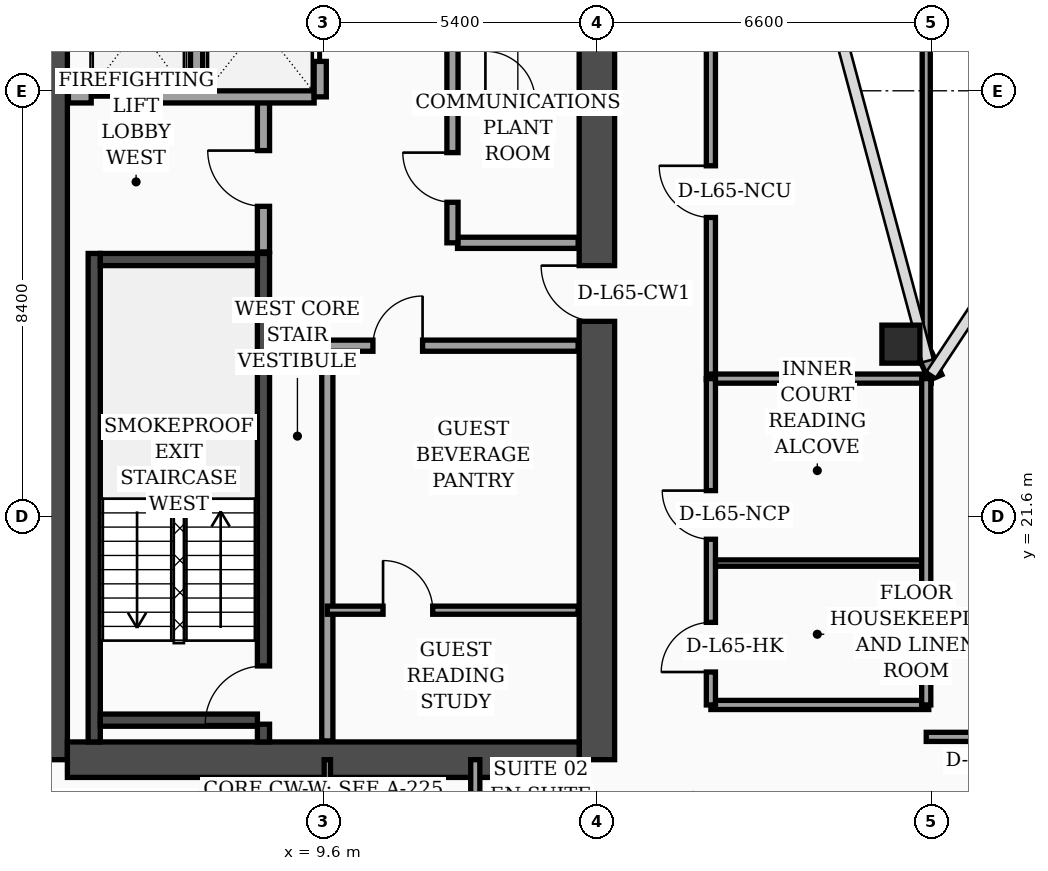
"""IFC4 building model, lengths in metres.
Left out: names, types, materials, properties, quantities, classifications, styles, units other than length and angle.
Written with IfcOpenShell. Run it as: python <this file> out.ifc"""

import sys

from ifc_helpers import new_model, si_unit, direction, frame, frame_2d, origin, origin_2d, place, context, subcontext, project, spatial, rectangle, hollow_rectangle, extrude, element, fill, save


model = new_model("IFC4")
c1 = context("Model", 3, precision=1e-05, world=origin(), true_north=direction((0.0, 1.0)))
c2 = subcontext(c1, "Body", "Model", "MODEL_VIEW")
j1 = project(units=[si_unit("LENGTHUNIT", "METRE"), si_unit("PLANEANGLEUNIT", "RADIAN")], contexts=[c1])
p1 = place(None, origin())
s1 = spatial("IfcSite", under=j1, at=p1, CompositionType="ELEMENT")
p2 = place(p1, origin())
s2 = spatial("IfcBuilding", under=s1, at=p2, CompositionType="ELEMENT")
p3 = place(p2, frame((0.0, 0.0, 263.5)))
s3 = spatial("IfcBuildingStorey", under=s2, at=p3, CompositionType="ELEMENT", Elevation=263.5)
p4 = place(p3, frame((4.2, 16.8, 0.0), z_axis=(0.0, 0.0, 1.0), x_axis=(0.0, 1.0, 0.0)))
e1 = element("IfcWall", 1, at=p4, inside=s3, PredefinedType="SHEAR", context=c2, shape_type="SweptSolid", body=[
    extrude(rectangle(XDim=21.6, YDim=0.7, at=frame_2d((10.8, 0.0))), origin(), (0.0, 0.0, 1.0), 3.56),
])
p5 = place(p3, frame((15.0, 16.8, 0.0), z_axis=(0.0, 0.0, 1.0), x_axis=(0.0, 1.0, 0.0)))
e2 = element("IfcWall", 2, at=p5, inside=s3, PredefinedType="SHEAR", context=c2, shape_type="SweptSolid", body=[
    extrude(rectangle(XDim=21.6, YDim=0.7, at=frame_2d((10.8, 0.0))), origin(), (0.0, 0.0, 1.0), 3.56),
])
p6 = place(p5, frame((8.65, 0.0, 0.0)))
e3 = element("IfcOpeningElement", 3, at=p6, cuts=e2, PredefinedType="OPENING", context=c2, shape_type="SweptSolid", body=[
    extrude(rectangle(XDim=1.1, YDim=2.2, at=frame_2d((0.55, 1.1))), frame((0.0, 0.36, 0.0), z_axis=(0.0, -1.0, 0.0), x_axis=(1.0, 0.0, 0.0)), (0.0, 0.0, 1.0), 0.72),
])
p7 = place(p5, frame((18.9, 0.0, 0.0)))
e4 = element("IfcOpeningElement", 4, at=p7, cuts=e2, PredefinedType="OPENING", context=c2, shape_type="SweptSolid", body=[
    extrude(rectangle(XDim=1.1, YDim=2.2, at=frame_2d((0.55, 1.1))), frame((0.0, 0.36, 0.0), z_axis=(0.0, -1.0, 0.0), x_axis=(1.0, 0.0, 0.0)), (0.0, 0.0, 1.0), 0.72),
])
p8 = place(p3, frame((4.55, 16.8, 0.0), z_axis=(0.0, 0.0, 1.0), x_axis=(1.0, 0.0, 0.0)))
e5 = element("IfcWall", 5, at=p8, inside=s3, PredefinedType="SHEAR", context=c2, shape_type="SweptSolid", body=[
    extrude(rectangle(XDim=10.1, YDim=0.7, at=frame_2d((5.05, 0.0))), origin(), (0.0, 0.0, 1.0), 3.56),
])
p9 = place(p3, frame((5.08, 17.15, 0.0), z_axis=(0.0, 0.0, 1.0), x_axis=(0.0, 1.0, 0.0)))
e6 = element("IfcWall", 6, at=p9, inside=s3, PredefinedType="SOLIDWALL", context=c2, shape_type="SweptSolid", body=[
    extrude(rectangle(XDim=9.64, YDim=0.24, at=frame_2d((4.82, 0.0))), origin(), (0.0, 0.0, 1.0), 3.56),
])
p10 = place(p3, frame((8.42, 17.15, 0.0), z_axis=(0.0, 0.0, 1.0), x_axis=(0.0, 1.0, 0.0)))
e7 = element("IfcWall", 7, at=p10, inside=s3, PredefinedType="SOLIDWALL", context=c2, shape_type="SweptSolid", body=[
    extrude(rectangle(XDim=9.64, YDim=0.24, at=frame_2d((4.82, 0.0))), origin(), (0.0, 0.0, 1.0), 3.56),
])
p11 = place(p10, frame((0.35, 0.0, 0.0)))
e8 = element("IfcOpeningElement", 8, at=p11, cuts=e7, PredefinedType="OPENING", context=c2, shape_type="SweptSolid", body=[
    extrude(rectangle(XDim=1.15, YDim=2.2, at=frame_2d((0.575, 1.1))), frame((0.0, 0.13, 0.0), z_axis=(0.0, -1.0, 0.0), x_axis=(1.0, 0.0, 0.0)), (0.0, 0.0, 1.0), 0.26),
])
for number, where, z_axis, x_axis in (
    (9, (5.2, 17.58, 0.0), (0.0, 0.0, 1.0), (1.0, 0.0, 0.0)),
    (10, (5.2, 26.67, 0.0), (0.0, 0.0, 1.0), (1.0, 0.0, 0.0)),
):
    element("IfcWall", number, at=place(p3, frame(where, z_axis=z_axis, x_axis=x_axis)), inside=s3, PredefinedType="SOLIDWALL", context=c2, shape_type="SweptSolid", body=[
        extrude(rectangle(XDim=3.1, YDim=0.24, at=frame_2d((1.55, 0.0))), origin(), (0.0, 0.0, 1.0), 3.56),
    ])
p12 = place(p3, frame((21.0, 25.0, 0.0), z_axis=(0.0, 0.0, 1.0), x_axis=(1.0, 0.0, 0.0)))
e11 = element("IfcColumn", 11, at=p12, inside=s3, PredefinedType="COLUMN", context=c2, shape_type="SweptSolid", body=[
    extrude(hollow_rectangle(XDim=0.75, YDim=0.75, WallThickness=0.032, at=origin_2d()), origin(), (0.0, 0.0, 1.0), 3.56),
])
p13 = place(p3, frame((21.68, 24.34, 0.0), z_axis=(0.0, 0.0, 1.0), x_axis=(-0.40758134973, 0.913168901875, 0.0)))
e12 = element("IfcWall", 12, at=p13, inside=s3, PredefinedType="SOLIDWALL", context=c2, shape_type="SweptSolid", body=[
    extrude(rectangle(XDim=0.471, YDim=0.28, at=frame_2d((0.235, 0.0))), origin(), (0.0, 0.0, 1.0), 3.56),
])
p14 = place(p3, frame((8.42, 26.82, 0.0), z_axis=(0.0, 0.0, 1.0), x_axis=(0.0, 1.0, 0.0)))
e13 = element("IfcWall", 13, at=p14, inside=s3, PredefinedType="SOLIDWALL", context=c2, shape_type="SweptSolid", body=[
    extrude(rectangle(XDim=3.0, YDim=0.24, at=frame_2d((1.5, 0.0))), origin(), (0.0, 0.0, 1.0), 3.56),
])
p15 = place(p14, frame((0.9, 0.0, 0.0)))
e14 = element("IfcOpeningElement", 14, at=p15, cuts=e13, PredefinedType="OPENING", context=c2, shape_type="SweptSolid", body=[
    extrude(rectangle(XDim=1.1, YDim=2.2, at=frame_2d((0.55, 1.1))), frame((0.0, 0.13, 0.0), z_axis=(0.0, -1.0, 0.0), x_axis=(1.0, 0.0, 0.0)), (0.0, 0.0, 1.0), 0.26),
])
p16 = place(p3, frame((4.57, 29.88, 0.0), z_axis=(0.0, 0.0, 1.0), x_axis=(1.0, 0.0, 0.0)))
e15 = element("IfcWall", 15, at=p16, inside=s3, PredefinedType="SOLIDWALL", context=c2, shape_type="SweptSolid", body=[
    extrude(rectangle(XDim=4.85, YDim=0.24, at=frame_2d((2.425, 0.0))), origin(), (0.0, 0.0, 1.0), 3.56),
])
p17 = place(p16, frame((0.45, 0.0, 0.0)))
e16 = element("IfcOpeningElement", 16, at=p17, cuts=e15, PredefinedType="OPENING", context=c2, shape_type="SweptSolid", body=[
    extrude(rectangle(XDim=1.3, YDim=2.35, at=frame_2d((0.65, 1.175))), frame((0.0, 0.13, 0.0), z_axis=(0.0, -1.0, 0.0), x_axis=(1.0, 0.0, 0.0)), (0.0, 0.0, 1.0), 0.26),
])
p18 = place(p3, frame((7.1, 30.02, 0.0), z_axis=(0.0, 0.0, 1.0), x_axis=(0.0, 1.0, 0.0)))
e17 = element("IfcWall", 17, at=p18, inside=s3, PredefinedType="SOLIDWALL", context=c2, shape_type="SweptSolid", body=[
    extrude(rectangle(XDim=2.63, YDim=0.24, at=frame_2d((1.315, 0.0))), origin(), (0.0, 0.0, 1.0), 3.56),
])
p19 = place(p3, frame((9.54, 29.88, 0.0), z_axis=(0.0, 0.0, 1.0), x_axis=(0.0, 1.0, 0.0)))
e18 = element("IfcWall", 18, at=p19, inside=s3, PredefinedType="SOLIDWALL", context=c2, shape_type="SweptSolid", body=[
    extrude(rectangle(XDim=2.9, YDim=0.24, at=frame_2d((1.45, 0.0))), origin(), (0.0, 0.0, 1.0), 3.56),
])
p20 = place(p19, frame((0.7, 0.0, 0.0)))
e19 = element("IfcOpeningElement", 19, at=p20, cuts=e18, PredefinedType="OPENING", context=c2, shape_type="SweptSolid", body=[
    extrude(rectangle(XDim=1.3, YDim=2.35, at=frame_2d((0.65, 1.175))), frame((0.0, 0.13, 0.0), z_axis=(0.0, -1.0, 0.0), x_axis=(1.0, 0.0, 0.0)), (0.0, 0.0, 1.0), 0.26),
])
p21 = place(p3, frame((9.68, 17.17, 0.0), z_axis=(0.0, 0.0, 1.0), x_axis=(0.0, 1.0, 0.0)))
e20 = element("IfcWall", 20, at=p21, inside=s3, PredefinedType="SOLIDWALL", context=c2, shape_type="SweptSolid", body=[
    extrude(rectangle(XDim=7.83, YDim=0.22, at=frame_2d((3.915, 0.0))), origin(), (0.0, 0.0, 1.0), 3.56),
])
p22 = place(p3, frame((9.68, 19.75, 0.0), z_axis=(0.0, 0.0, 1.0), x_axis=(1.0, 0.0, 0.0)))
e21 = element("IfcWall", 21, at=p22, inside=s3, PredefinedType="PARTITIONING", context=c2, shape_type="SweptSolid", body=[
    extrude(rectangle(XDim=4.95, YDim=0.16, at=frame_2d((2.475, 0.0))), origin(), (0.0, 0.0, 1.0), 3.56),
])
p23 = place(p22, frame((1.1, 0.0, 0.0)))
e22 = element("IfcOpeningElement", 22, at=p23, cuts=e21, PredefinedType="OPENING", context=c2, shape_type="SweptSolid", body=[
    extrude(rectangle(XDim=0.98, YDim=2.15, at=frame_2d((0.49, 1.075))), frame((0.0, 0.09, 0.0), z_axis=(0.0, -1.0, 0.0), x_axis=(1.0, 0.0, 0.0)), (0.0, 0.0, 1.0), 0.18),
])
p24 = place(p3, frame((9.68, 24.97, 0.0), z_axis=(0.0, 0.0, 1.0), x_axis=(1.0, 0.0, 0.0)))
e23 = element("IfcWall", 23, at=p24, inside=s3, PredefinedType="SOLIDWALL", context=c2, shape_type="SweptSolid", body=[
    extrude(rectangle(XDim=4.95, YDim=0.22, at=frame_2d((2.475, 0.0))), origin(), (0.0, 0.0, 1.0), 2.99),
])
p25 = place(p24, frame((0.9, 0.0, 0.0)))
e24 = element("IfcOpeningElement", 24, at=p25, cuts=e23, PredefinedType="OPENING", context=c2, shape_type="SweptSolid", body=[
    extrude(rectangle(XDim=0.98, YDim=2.15, at=frame_2d((0.49, 1.075))), frame((0.0, 0.12, 0.0), z_axis=(0.0, -1.0, 0.0), x_axis=(1.0, 0.0, 0.0)), (0.0, 0.0, 1.0), 0.24),
])
p26 = place(p3, frame((12.25, 27.0, 0.0), z_axis=(0.0, 0.0, 1.0), x_axis=(1.0, 0.0, 0.0)))
e25 = element("IfcWall", 25, at=p26, inside=s3, PredefinedType="SOLIDWALL", context=c2, shape_type="SweptSolid", body=[
    extrude(rectangle(XDim=2.38, YDim=0.22, at=frame_2d((1.19, 0.0))), origin(), (0.0, 0.0, 1.0), 3.56),
])
p27 = place(p3, frame((12.15, 27.0, 0.0), z_axis=(0.0, 0.0, 1.0), x_axis=(0.0, 1.0, 0.0)))
e26 = element("IfcWall", 26, at=p27, inside=s3, PredefinedType="SOLIDWALL", context=c2, shape_type="SweptSolid", body=[
    extrude(rectangle(XDim=7.75, YDim=0.22, at=frame_2d((3.875, 0.0))), origin(), (0.0, 0.0, 1.0), 3.56),
])
p28 = place(p27, frame((0.8, 0.0, 0.0)))
e27 = element("IfcOpeningElement", 27, at=p28, cuts=e26, PredefinedType="OPENING", context=c2, shape_type="SweptSolid", body=[
    extrude(rectangle(XDim=0.98, YDim=2.15, at=frame_2d((0.49, 1.075))), frame((0.0, 0.12, 0.0), z_axis=(0.0, -1.0, 0.0), x_axis=(1.0, 0.0, 0.0)), (0.0, 0.0, 1.0), 0.24),
])
p29 = place(p3, frame((12.25, 29.8, 0.0), z_axis=(0.0, 0.0, 1.0), x_axis=(1.0, 0.0, 0.0)))
e28 = element("IfcWall", 28, at=p29, inside=s3, PredefinedType="PARTITIONING", context=c2, shape_type="SweptSolid", body=[
    extrude(rectangle(XDim=2.38, YDim=0.16, at=frame_2d((1.19, 0.0))), origin(), (0.0, 0.0, 1.0), 3.56),
])
p30 = place(p29, frame((0.55, 0.0, 0.0)))
e29 = element("IfcOpeningElement", 29, at=p30, cuts=e28, PredefinedType="OPENING", context=c2, shape_type="SweptSolid", body=[
    extrude(rectangle(XDim=0.98, YDim=2.15, at=frame_2d((0.49, 1.075))), frame((0.0, 0.09, 0.0), z_axis=(0.0, -1.0, 0.0), x_axis=(1.0, 0.0, 0.0)), (0.0, 0.0, 1.0), 0.18),
])
p31 = place(p3, frame((9.68, 14.67, 0.0), z_axis=(0.0, 0.0, 1.0), x_axis=(0.0, 1.0, 0.0)))
e30 = element("IfcWall", 30, at=p31, inside=s3, PredefinedType="PARTITIONING", context=c2, shape_type="SweptSolid", body=[
    extrude(rectangle(XDim=2.13, YDim=0.125, at=frame_2d((1.065, 0.0))), origin(), (0.0, 0.0, 1.0), 3.56),
])
p32 = place(p3, frame((12.6, 2.44, 0.0), z_axis=(0.0, 0.0, 1.0), x_axis=(0.0, 1.0, 0.0)))
e31 = element("IfcWall", 31, at=p32, inside=s3, PredefinedType="PARTITIONING", context=c2, shape_type="SweptSolid", body=[
    extrude(rectangle(XDim=14.36, YDim=0.18, at=frame_2d((7.18, 0.0))), origin(), (0.0, 0.0, 1.0), 2.99),
])
p33 = place(p32, frame((3.01, 0.0, 0.0)))
e32 = element("IfcOpeningElement", 32, at=p33, cuts=e31, PredefinedType="OPENING", context=c2, shape_type="SweptSolid", body=[
    extrude(rectangle(XDim=1.02, YDim=2.2, at=frame_2d((0.51, 1.1))), frame((0.0, 0.1, 0.0), z_axis=(0.0, -1.0, 0.0), x_axis=(1.0, 0.0, 0.0)), (0.0, 0.0, 1.0), 0.2),
])
p34 = place(p32, frame((8.94, 0.0, 0.0)))
e33 = element("IfcOpeningElement", 33, at=p34, cuts=e31, PredefinedType="OPENING", context=c2, shape_type="SweptSolid", body=[
    extrude(rectangle(XDim=1.02, YDim=2.2, at=frame_2d((0.51, 1.1))), frame((0.0, 0.1, 0.0), z_axis=(0.0, -1.0, 0.0), x_axis=(1.0, 0.0, 0.0)), (0.0, 0.0, 1.0), 0.2),
])
p35 = place(p3, frame((17.25, 24.3, 0.0), z_axis=(0.0, 0.0, 1.0), x_axis=(0.0, 1.0, 0.0)))
e34 = element("IfcWall", 34, at=p35, inside=s3, PredefinedType="PARTITIONING", context=c2, shape_type="SweptSolid", body=[
    extrude(rectangle(XDim=18.15, YDim=0.18, at=frame_2d((9.075, 0.0))), origin(), (0.0, 0.0, 1.0), 2.99),
])
p36 = place(p35, frame((3.2, 0.0, 0.0)))
e35 = element("IfcOpeningElement", 35, at=p36, cuts=e34, PredefinedType="OPENING", context=c2, shape_type="SweptSolid", body=[
    extrude(rectangle(XDim=1.02, YDim=2.2, at=frame_2d((0.51, 1.1))), frame((0.0, 0.1, 0.0), z_axis=(0.0, -1.0, 0.0), x_axis=(1.0, 0.0, 0.0)), (0.0, 0.0, 1.0), 0.2),
])
p37 = place(p3, frame((17.25, 17.88, 0.0), z_axis=(0.0, 0.0, 1.0), x_axis=(1.0, 0.0, 0.0)))
e36 = element("IfcWall", 36, at=p37, inside=s3, PredefinedType="PARTITIONING", context=c2, shape_type="SweptSolid", body=[
    extrude(rectangle(XDim=4.3, YDim=0.18, at=frame_2d((2.15, 0.0))), origin(), (0.0, 0.0, 1.0), 3.56),
])
p38 = place(p3, frame((17.25, 20.68, 0.0), z_axis=(0.0, 0.0, 1.0), x_axis=(1.0, 0.0, 0.0)))
e37 = element("IfcWall", 37, at=p38, inside=s3, PredefinedType="PARTITIONING", context=c2, shape_type="SweptSolid", body=[
    extrude(rectangle(XDim=4.3, YDim=0.125, at=frame_2d((2.15, 0.0))), origin(), (0.0, 0.0, 1.0), 3.56),
])
p39 = place(p3, frame((17.25, 24.32, 0.0), z_axis=(0.0, 0.0, 1.0), x_axis=(1.0, 0.0, 0.0)))
e38 = element("IfcWall", 38, at=p39, inside=s3, PredefinedType="PARTITIONING", context=c2, shape_type="SweptSolid", body=[
    extrude(rectangle(XDim=4.35, YDim=0.18, at=frame_2d((2.175, 0.0))), origin(), (0.0, 0.0, 1.0), 3.56),
])
p40 = place(p3, frame((21.5, 17.88, 0.0), z_axis=(0.0, 0.0, 1.0), x_axis=(0.0, 1.0, 0.0)))
e39 = element("IfcWall", 39, at=p40, inside=s3, PredefinedType="PARTITIONING", context=c2, shape_type="SweptSolid", body=[
    extrude(rectangle(XDim=6.44, YDim=0.18, at=frame_2d((3.22, 0.0))), origin(), (0.0, 0.0, 1.0), 3.56),
])
p41 = place(p3, frame((17.25, 17.88, 0.0), z_axis=(0.0, 0.0, 1.0), x_axis=(0.0, 1.0, 0.0)))
e40 = element("IfcWall", 40, at=p41, inside=s3, PredefinedType="PARTITIONING", context=c2, shape_type="SweptSolid", body=[
    extrude(rectangle(XDim=6.44, YDim=0.18, at=frame_2d((3.22, 0.0))), origin(), (0.0, 0.0, 1.0), 3.56),
])
p42 = place(p41, frame((0.65, 0.0, 0.0)))
e41 = element("IfcOpeningElement", 41, at=p42, cuts=e40, PredefinedType="OPENING", context=c2, shape_type="SweptSolid", body=[
    extrude(rectangle(XDim=0.98, YDim=2.15, at=frame_2d((0.49, 1.075))), frame((0.0, 0.1, 0.0), z_axis=(0.0, -1.0, 0.0), x_axis=(1.0, 0.0, 0.0)), (0.0, 0.0, 1.0), 0.2),
])
p43 = place(p41, frame((3.27, 0.0, 0.0)))
e42 = element("IfcOpeningElement", 42, at=p43, cuts=e40, PredefinedType="OPENING", context=c2, shape_type="SweptSolid", body=[
    extrude(rectangle(XDim=0.96, YDim=2.2, at=frame_2d((0.48, 1.1))), frame((0.0, 0.1, 0.0), z_axis=(0.0, -1.0, 0.0), x_axis=(1.0, 0.0, 0.0)), (0.0, 0.0, 1.0), 0.2),
])
p44 = place(p3, frame((21.5, 24.85, 0.0), z_axis=(0.0, 0.0, 1.0), x_axis=(0.0, 1.0, 0.0)))
e43 = element("IfcWall", 43, at=p44, inside=s3, PredefinedType="PARTITIONING", context=c2, shape_type="SweptSolid", body=[
    extrude(rectangle(XDim=13.05, YDim=0.16, at=frame_2d((6.525, 0.0))), origin(), (0.0, 0.0, 1.0), 2.99),
])
p45 = place(p3, frame((21.5, 17.25, 0.0), z_axis=(0.0, 0.0, 1.0), x_axis=(1.0, 0.0, 0.0)))
e44 = element("IfcWall", 44, at=p45, inside=s3, PredefinedType="PARTITIONING", context=c2, shape_type="SweptSolid", body=[
    extrude(rectangle(XDim=6.9, YDim=0.18, at=frame_2d((3.45, 0.0))), origin(), (0.0, 0.0, 1.0), 3.56),
])
p46 = place(p45, frame((0.95, 0.0, 0.0)))
e45 = element("IfcOpeningElement", 45, at=p46, cuts=e44, PredefinedType="OPENING", context=c2, shape_type="SweptSolid", body=[
    extrude(rectangle(XDim=1.02, YDim=2.2, at=frame_2d((0.51, 1.1))), frame((0.0, 0.1, 0.0), z_axis=(0.0, -1.0, 0.0), x_axis=(1.0, 0.0, 0.0)), (0.0, 0.0, 1.0), 0.2),
])
p47 = place(p15, origin())
e46 = element("IfcDoor", 46, at=p47, inside=s3, OperationType="SINGLE_SWING_RIGHT", PredefinedType="DOOR", context=c2, shape_type="SweptSolid", body=[
    extrude(rectangle(XDim=1.1, YDim=2.2, at=frame_2d((0.55, 1.1))), frame((0.0, 0.025, 0.0), z_axis=(0.0, -1.0, 0.0), x_axis=(1.0, 0.0, 0.0)), (0.0, 0.0, 1.0), 0.05),
])
fill(e14, e46)
p48 = place(p17, origin())
e47 = element("IfcDoor", 47, at=p48, inside=s3, OperationType="DOUBLE_DOOR_SLIDING", PredefinedType="DOOR", context=c2, shape_type="SweptSolid", body=[
    extrude(rectangle(XDim=1.3, YDim=2.35, at=frame_2d((0.65, 1.175))), frame((0.0, 0.025, 0.0), z_axis=(0.0, -1.0, 0.0), x_axis=(1.0, 0.0, 0.0)), (0.0, 0.0, 1.0), 0.05),
])
fill(e16, e47)
p49 = place(p20, origin())
e48 = element("IfcDoor", 48, at=p49, inside=s3, OperationType="DOUBLE_DOOR_SLIDING", PredefinedType="DOOR", context=c2, shape_type="SweptSolid", body=[
    extrude(rectangle(XDim=1.3, YDim=2.35, at=frame_2d((0.65, 1.175))), frame((0.0, 0.025, 0.0), z_axis=(0.0, -1.0, 0.0), x_axis=(1.0, 0.0, 0.0)), (0.0, 0.0, 1.0), 0.05),
])
fill(e19, e48)
p50 = place(p23, origin())
e49 = element("IfcDoor", 49, at=p50, inside=s3, OperationType="SINGLE_SWING_LEFT", PredefinedType="DOOR", context=c2, shape_type="SweptSolid", body=[
    extrude(rectangle(XDim=0.98, YDim=2.15, at=frame_2d((0.49, 1.075))), frame((0.0, 0.025, 0.0), z_axis=(0.0, -1.0, 0.0), x_axis=(1.0, 0.0, 0.0)), (0.0, 0.0, 1.0), 0.05),
])
fill(e22, e49)
p51 = place(p25, origin())
e50 = element("IfcDoor", 50, at=p51, inside=s3, OperationType="SINGLE_SWING_RIGHT", PredefinedType="DOOR", context=c2, shape_type="SweptSolid", body=[
    extrude(rectangle(XDim=0.98, YDim=2.15, at=frame_2d((0.49, 1.075))), frame((0.0, 0.025, 0.0), z_axis=(0.0, -1.0, 0.0), x_axis=(1.0, 0.0, 0.0)), (0.0, 0.0, 1.0), 0.05),
])
fill(e24, e50)
p52 = place(p28, origin())
e51 = element("IfcDoor", 51, at=p52, inside=s3, OperationType="SINGLE_SWING_RIGHT", PredefinedType="DOOR", context=c2, shape_type="SweptSolid", body=[
    extrude(rectangle(XDim=0.98, YDim=2.15, at=frame_2d((0.49, 1.075))), frame((0.0, 0.025, 0.0), z_axis=(0.0, -1.0, 0.0), x_axis=(1.0, 0.0, 0.0)), (0.0, 0.0, 1.0), 0.05),
])
fill(e27, e51)
p53 = place(p30, origin())
e52 = element("IfcDoor", 52, at=p53, inside=s3, OperationType="SINGLE_SWING_LEFT", PredefinedType="DOOR", context=c2, shape_type="SweptSolid", body=[
    extrude(rectangle(XDim=0.98, YDim=2.15, at=frame_2d((0.49, 1.075))), frame((0.0, 0.025, 0.0), z_axis=(0.0, -1.0, 0.0), x_axis=(1.0, 0.0, 0.0)), (0.0, 0.0, 1.0), 0.05),
])
fill(e29, e52)
p54 = place(p36, origin())
e53 = element("IfcDoor", 53, at=p54, inside=s3, OperationType="SINGLE_SWING_RIGHT", PredefinedType="DOOR", context=c2, shape_type="SweptSolid", body=[
    extrude(rectangle(XDim=1.02, YDim=2.2, at=frame_2d((0.51, 1.1))), frame((0.0, 0.025, 0.0), z_axis=(0.0, -1.0, 0.0), x_axis=(1.0, 0.0, 0.0)), (0.0, 0.0, 1.0), 0.05),
])
fill(e35, e53)
p55 = place(p42, origin())
e54 = element("IfcDoor", 54, at=p55, inside=s3, OperationType="SINGLE_SWING_LEFT", PredefinedType="DOOR", context=c2, shape_type="SweptSolid", body=[
    extrude(rectangle(XDim=0.98, YDim=2.15, at=frame_2d((0.49, 1.075))), frame((0.0, 0.025, 0.0), z_axis=(0.0, -1.0, 0.0), x_axis=(1.0, 0.0, 0.0)), (0.0, 0.0, 1.0), 0.05),
])
fill(e41, e54)
p56 = place(p43, origin())
e55 = element("IfcDoor", 55, at=p56, inside=s3, OperationType="SINGLE_SWING_RIGHT", PredefinedType="DOOR", context=c2, shape_type="SweptSolid", body=[
    extrude(rectangle(XDim=0.96, YDim=2.2, at=frame_2d((0.48, 1.1))), frame((0.0, 0.025, 0.0), z_axis=(0.0, -1.0, 0.0), x_axis=(1.0, 0.0, 0.0)), (0.0, 0.0, 1.0), 0.05),
])
fill(e42, e55)
p57 = place(p11, origin())
e56 = element("IfcDoor", 56, at=p57, inside=s3, OperationType="SINGLE_SWING_LEFT", PredefinedType="DOOR", context=c2, shape_type="SweptSolid", body=[
    extrude(rectangle(XDim=1.15, YDim=2.2, at=frame_2d((0.575, 1.1))), frame((0.0, 0.025, 0.0), z_axis=(0.0, -1.0, 0.0), x_axis=(1.0, 0.0, 0.0)), (0.0, 0.0, 1.0), 0.05),
])
fill(e8, e56)
p58 = place(p6, origin())
e57 = element("IfcDoor", 57, at=p58, inside=s3, OperationType="SINGLE_SWING_RIGHT", PredefinedType="DOOR", context=c2, shape_type="SweptSolid", body=[
    extrude(rectangle(XDim=1.1, YDim=2.2, at=frame_2d((0.55, 1.1))), frame((0.0, 0.025, 0.0), z_axis=(0.0, -1.0, 0.0), x_axis=(1.0, 0.0, 0.0)), (0.0, 0.0, 1.0), 0.05),
])
fill(e3, e57)
save(model, sys.argv[1])
